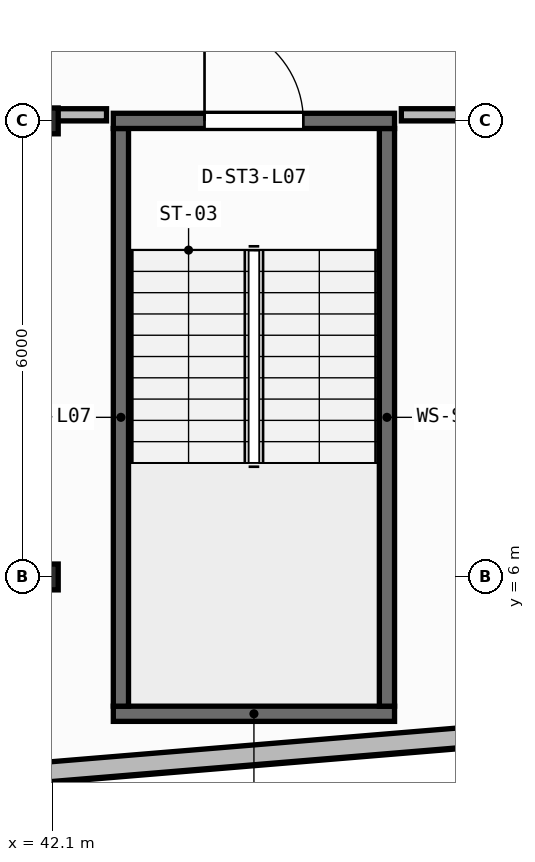
"""IFC4 building model, lengths in metres.
Left out: names, types, materials, properties, quantities, classifications, styles, units other than length and angle.
Written with IfcOpenShell. Run it as: python <this file> out.ifc"""

import sys

from ifc_helpers import new_model, si_unit, direction, frame, frame_2d, origin, origin_2d, place, context, subcontext, project, spatial, rectangle, i_section, extrude, element, fill, save


model = new_model("IFC4")
c1 = context("Model", 3, precision=1e-05, world=origin(), true_north=direction((0.0, 1.0)))
c2 = subcontext(c1, "Body", "Model", "MODEL_VIEW")
j1 = project(units=[si_unit("LENGTHUNIT", "METRE"), si_unit("PLANEANGLEUNIT", "RADIAN")], contexts=[c1])
p1 = place(None, origin())
s1 = spatial("IfcSite", under=j1, at=p1, CompositionType="ELEMENT")
p2 = place(p1, origin())
s2 = spatial("IfcBuilding", under=s1, at=p2, CompositionType="ELEMENT")
p3 = place(p2, frame((0.0, 0.0, 30.4)))
s3 = spatial("IfcBuildingStorey", under=s2, at=p3, CompositionType="ELEMENT", Elevation=30.4)
for number, where, z_axis, x_axis in (
    (1, (42.0, 6.0, 0.0), (0.0, 0.0, 1.0), (1.0, 0.0, 0.0)),
    (2, (42.0, 12.0, 0.0), (0.0, 0.0, 1.0), (1.0, 0.0, 0.0)),
):
    element("IfcColumn", number, at=place(p3, frame(where, z_axis=z_axis, x_axis=x_axis)), inside=s3, PredefinedType="COLUMN", context=c2, shape_type="SweptSolid", body=[
        extrude(i_section(OverallWidth=0.35, OverallDepth=0.34, WebThickness=0.016, FlangeThickness=0.028, at=origin_2d()), origin(), (0.0, 0.0, 1.0), 3.95),
    ])
p4 = place(p3, frame((2.76, 0.174, 0.0), z_axis=(0.0, 0.0, 1.0), x_axis=(0.996571478456, 0.082736257641, 0.0)))
e3 = element("IfcWall", 3, at=p4, inside=s3, PredefinedType="STANDARD", context=c2, shape_type="SweptSolid", body=[
    extrude(rectangle(XDim=52.861, YDim=0.26, at=frame_2d((26.431, 0.0))), origin(), (0.0, 0.0, 1.0), 3.71),
])
p5 = place(p4, frame((25.231, 0.0, 0.9)))
e4 = element("IfcOpeningElement", 4, at=p5, cuts=e3, PredefinedType="OPENING", context=c2, shape_type="SweptSolid", body=[
    extrude(rectangle(XDim=2.4, YDim=1.65, at=frame_2d((1.2, 0.825))), frame((0.0, 0.14, 0.0), z_axis=(0.0, -1.0, 0.0), x_axis=(1.0, 0.0, 0.0)), (0.0, 0.0, 1.0), 0.28),
])
p6 = place(p3, frame((42.9, 4.2, 0.0), z_axis=(0.0, 0.0, 1.0), x_axis=(1.0, 0.0, 0.0)))
e5 = element("IfcWall", 5, at=p6, inside=s3, PredefinedType="SHEAR", context=c2, shape_type="SweptSolid", body=[
    extrude(rectangle(XDim=3.7, YDim=0.2, at=frame_2d((1.85, 0.0))), origin(), (0.0, 0.0, 1.0), 3.71),
])
for number, where, z_axis, x_axis in (
    (6, (43.0, 4.3, 0.0), (0.0, 0.0, 1.0), (0.0, 1.0, 0.0)),
    (7, (46.5, 4.3, 0.0), (0.0, 0.0, 1.0), (0.0, 1.0, 0.0)),
):
    element("IfcWall", number, at=place(p3, frame(where, z_axis=z_axis, x_axis=x_axis)), inside=s3, PredefinedType="SHEAR", context=c2, shape_type="SweptSolid", body=[
        extrude(rectangle(XDim=7.6, YDim=0.2, at=frame_2d((3.8, 0.0))), origin(), (0.0, 0.0, 1.0), 3.71),
    ])
p7 = place(p3, frame((42.9, 12.0, 0.0), z_axis=(0.0, 0.0, 1.0), x_axis=(1.0, 0.0, 0.0)))
e8 = element("IfcWall", 8, at=p7, inside=s3, PredefinedType="SHEAR", context=c2, shape_type="SweptSolid", body=[
    extrude(rectangle(XDim=3.7, YDim=0.2, at=frame_2d((1.85, 0.0))), origin(), (0.0, 0.0, 1.0), 3.71),
])
p8 = place(p7, frame((1.2, 0.0, 0.0)))
e9 = element("IfcOpeningElement", 9, at=p8, cuts=e8, PredefinedType="OPENING", context=c2, shape_type="SweptSolid", body=[
    extrude(rectangle(XDim=1.3, YDim=2.15, at=frame_2d((0.65, 1.075))), frame((0.0, 0.11, 0.0), z_axis=(0.0, -1.0, 0.0), x_axis=(1.0, 0.0, 0.0)), (0.0, 0.0, 1.0), 0.22),
])
p9 = place(p3, frame((31.63, 12.08, 0.0), z_axis=(0.0, 0.0, 1.0), x_axis=(1.0, 0.0, 0.0)))
e10 = element("IfcWall", 10, at=p9, inside=s3, PredefinedType="PARTITIONING", context=c2, shape_type="SweptSolid", body=[
    extrude(rectangle(XDim=11.181, YDim=0.16, at=frame_2d((5.59, 0.0))), origin(), (0.0, 0.0, 1.0), 3.073),
])
p10 = place(p3, frame((46.689, 12.08, 0.0), z_axis=(0.0, 0.0, 1.0), x_axis=(1.0, 0.0, 0.0)))
e11 = element("IfcWall", 11, at=p10, inside=s3, PredefinedType="PARTITIONING", context=c2, shape_type="SweptSolid", body=[
    extrude(rectangle(XDim=3.011, YDim=0.16, at=frame_2d((1.505, 0.0))), origin(), (0.0, 0.0, 1.0), 3.073),
])
p11 = place(p8, origin())
e12 = element("IfcDoor", 12, at=p11, inside=s3, OperationType="SINGLE_SWING_LEFT", PredefinedType="DOOR", context=c2, shape_type="SweptSolid", body=[
    extrude(rectangle(XDim=1.3, YDim=2.15, at=frame_2d((0.65, 1.075))), frame((0.0, 0.025, 0.0), z_axis=(0.0, -1.0, 0.0), x_axis=(1.0, 0.0, 0.0)), (0.0, 0.0, 1.0), 0.05),
])
fill(e9, e12)
save(model, sys.argv[1])
